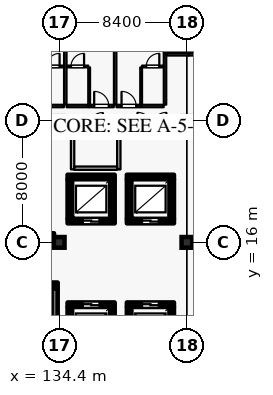
"""IFC4 building model, lengths in metres.
Left out: names, types, materials, properties, quantities, classifications, styles, units other than length and angle.
Written with IfcOpenShell. Run it as: python <this file> out.ifc"""

import sys

from ifc_helpers import new_model, si_unit, direction, frame, frame_2d, origin, origin_2d, place, context, subcontext, project, spatial, rectangle, hollow_rectangle, extrude, element, fill, save


model = new_model("IFC4")
c1 = context("Model", 3, precision=1e-05, world=origin(), true_north=direction((0.0, 1.0)))
c2 = subcontext(c1, "Body", "Model", "MODEL_VIEW")
j1 = project(units=[si_unit("LENGTHUNIT", "METRE"), si_unit("PLANEANGLEUNIT", "RADIAN")], contexts=[c1])
p1 = place(None, origin())
s1 = spatial("IfcSite", under=j1, at=p1, CompositionType="ELEMENT")
p2 = place(p1, origin())
s2 = spatial("IfcBuilding", under=s1, at=p2, CompositionType="ELEMENT")
p3 = place(p2, frame((0.0, 0.0, 36.0)))
s3 = spatial("IfcBuildingStorey", under=s2, at=p3, CompositionType="ELEMENT", Elevation=36.0)
for number, where, z_axis, x_axis in (
    (1, (134.4, 16.0, 0.0), (0.0, 0.0, 1.0), (1.0, 0.0, 0.0)),
    (2, (142.8, 16.0, 0.0), (0.0, 0.0, 1.0), (1.0, 0.0, 0.0)),
):
    element("IfcColumn", number, at=place(p3, frame(where, z_axis=z_axis, x_axis=x_axis)), inside=s3, PredefinedType="COLUMN", context=c2, shape_type="SweptSolid", body=[
        extrude(rectangle(XDim=0.7, YDim=0.7, at=origin_2d()), origin(), (0.0, 0.0, 1.0), 3.6),
    ])
for number, where, z_axis, x_axis in (
    (3, (134.4, 24.0, 0.0), (0.0, 0.0, 1.0), (1.0, 0.0, 0.0)),
    (4, (142.8, 24.0, 0.0), (0.0, 0.0, 1.0), (1.0, 0.0, 0.0)),
):
    element("IfcColumn", number, at=place(p3, frame(where, z_axis=z_axis, x_axis=x_axis)), inside=s3, PredefinedType="COLUMN", context=c2, shape_type="SweptSolid", body=[
        extrude(rectangle(XDim=0.6, YDim=0.6, at=origin_2d()), origin(), (0.0, 0.0, 1.0), 3.6),
    ])
p4 = place(p3, frame((134.95, 17.4, 0.0), z_axis=(0.0, 0.0, 1.0), x_axis=(1.0, 0.0, 0.0)))
e5 = element("IfcWall", 5, at=p4, inside=s3, PredefinedType="SHEAR", context=c2, shape_type="SweptSolid", body=[
    extrude(rectangle(XDim=3.1, YDim=0.3, at=frame_2d((1.55, 0.0))), origin(), (0.0, 0.0, 1.0), 3.365),
])
p5 = place(p4, frame((1.0, 0.0, 0.0)))
e6 = element("IfcOpeningElement", 6, at=p5, cuts=e5, PredefinedType="OPENING", context=c2, shape_type="SweptSolid", body=[
    extrude(rectangle(XDim=1.1, YDim=2.2, at=frame_2d((0.55, 1.1))), frame((0.0, 0.16, 0.0), z_axis=(0.0, -1.0, 0.0), x_axis=(1.0, 0.0, 0.0)), (0.0, 0.0, 1.0), 0.32),
])
p6 = place(p3, frame((137.9, 17.555, 0.0), z_axis=(0.0, 0.0, 1.0), x_axis=(0.0, 1.0, 0.0)))
e7 = element("IfcWall", 7, at=p6, inside=s3, PredefinedType="SHEAR", context=c2, shape_type="SweptSolid", body=[
    extrude(rectangle(XDim=2.59, YDim=0.3, at=frame_2d((1.295, 0.0))), origin(), (0.0, 0.0, 1.0), 3.365),
])
p7 = place(p3, frame((138.05, 20.3, 0.0), z_axis=(0.0, 0.0, 1.0), x_axis=(-1.0, 0.0, 0.0)))
e8 = element("IfcWall", 8, at=p7, inside=s3, PredefinedType="SHEAR", context=c2, shape_type="SweptSolid", body=[
    extrude(rectangle(XDim=3.1, YDim=0.3, at=frame_2d((1.55, 0.0))), origin(), (0.0, 0.0, 1.0), 3.365),
])
p8 = place(p3, frame((135.1, 20.145, 0.0), z_axis=(0.0, 0.0, 1.0), x_axis=(0.0, -1.0, 0.0)))
e9 = element("IfcWall", 9, at=p8, inside=s3, PredefinedType="SHEAR", context=c2, shape_type="SweptSolid", body=[
    extrude(rectangle(XDim=2.59, YDim=0.3, at=frame_2d((1.295, 0.0))), origin(), (0.0, 0.0, 1.0), 3.365),
])
p9 = place(p3, frame((138.85, 17.4, 0.0), z_axis=(0.0, 0.0, 1.0), x_axis=(1.0, 0.0, 0.0)))
e10 = element("IfcWall", 10, at=p9, inside=s3, PredefinedType="SHEAR", context=c2, shape_type="SweptSolid", body=[
    extrude(rectangle(XDim=3.1, YDim=0.3, at=frame_2d((1.55, 0.0))), origin(), (0.0, 0.0, 1.0), 3.365),
])
p10 = place(p9, frame((1.0, 0.0, 0.0)))
e11 = element("IfcOpeningElement", 11, at=p10, cuts=e10, PredefinedType="OPENING", context=c2, shape_type="SweptSolid", body=[
    extrude(rectangle(XDim=1.1, YDim=2.2, at=frame_2d((0.55, 1.1))), frame((0.0, 0.16, 0.0), z_axis=(0.0, -1.0, 0.0), x_axis=(1.0, 0.0, 0.0)), (0.0, 0.0, 1.0), 0.32),
])
p11 = place(p3, frame((141.8, 17.555, 0.0), z_axis=(0.0, 0.0, 1.0), x_axis=(0.0, 1.0, 0.0)))
e12 = element("IfcWall", 12, at=p11, inside=s3, PredefinedType="SHEAR", context=c2, shape_type="SweptSolid", body=[
    extrude(rectangle(XDim=2.59, YDim=0.3, at=frame_2d((1.295, 0.0))), origin(), (0.0, 0.0, 1.0), 3.365),
])
p12 = place(p3, frame((141.95, 20.3, 0.0), z_axis=(0.0, 0.0, 1.0), x_axis=(-1.0, 0.0, 0.0)))
e13 = element("IfcWall", 13, at=p12, inside=s3, PredefinedType="SHEAR", context=c2, shape_type="SweptSolid", body=[
    extrude(rectangle(XDim=3.1, YDim=0.3, at=frame_2d((1.55, 0.0))), origin(), (0.0, 0.0, 1.0), 3.365),
])
for number, where, z_axis, x_axis in (
    (14, (139.0, 20.145, 0.0), (0.0, 0.0, 1.0), (0.0, -1.0, 0.0)),
    (15, (137.9, 9.155, 0.0), (0.0, 0.0, 1.0), (0.0, 1.0, 0.0)),
):
    element("IfcWall", number, at=place(p3, frame(where, z_axis=z_axis, x_axis=x_axis)), inside=s3, PredefinedType="SHEAR", context=c2, shape_type="SweptSolid", body=[
        extrude(rectangle(XDim=2.59, YDim=0.3, at=frame_2d((1.295, 0.0))), origin(), (0.0, 0.0, 1.0), 3.365),
    ])
p13 = place(p3, frame((138.05, 11.9, 0.0), z_axis=(0.0, 0.0, 1.0), x_axis=(-1.0, 0.0, 0.0)))
e16 = element("IfcWall", 16, at=p13, inside=s3, PredefinedType="SHEAR", context=c2, shape_type="SweptSolid", body=[
    extrude(rectangle(XDim=3.1, YDim=0.3, at=frame_2d((1.55, 0.0))), origin(), (0.0, 0.0, 1.0), 3.365),
])
p14 = place(p13, frame((1.0, 0.0, 0.0)))
e17 = element("IfcOpeningElement", 17, at=p14, cuts=e16, PredefinedType="OPENING", context=c2, shape_type="SweptSolid", body=[
    extrude(rectangle(XDim=1.1, YDim=2.2, at=frame_2d((0.55, 1.1))), frame((0.0, 0.16, 0.0), z_axis=(0.0, -1.0, 0.0), x_axis=(1.0, 0.0, 0.0)), (0.0, 0.0, 1.0), 0.32),
])
for number, where, z_axis, x_axis in (
    (18, (135.1, 11.745, 0.0), (0.0, 0.0, 1.0), (0.0, -1.0, 0.0)),
    (19, (141.8, 9.155, 0.0), (0.0, 0.0, 1.0), (0.0, 1.0, 0.0)),
):
    element("IfcWall", number, at=place(p3, frame(where, z_axis=z_axis, x_axis=x_axis)), inside=s3, PredefinedType="SHEAR", context=c2, shape_type="SweptSolid", body=[
        extrude(rectangle(XDim=2.59, YDim=0.3, at=frame_2d((1.295, 0.0))), origin(), (0.0, 0.0, 1.0), 3.365),
    ])
p15 = place(p3, frame((141.95, 11.9, 0.0), z_axis=(0.0, 0.0, 1.0), x_axis=(-1.0, 0.0, 0.0)))
e20 = element("IfcWall", 20, at=p15, inside=s3, PredefinedType="SHEAR", context=c2, shape_type="SweptSolid", body=[
    extrude(rectangle(XDim=3.1, YDim=0.3, at=frame_2d((1.55, 0.0))), origin(), (0.0, 0.0, 1.0), 3.365),
])
p16 = place(p15, frame((1.0, 0.0, 0.0)))
e21 = element("IfcOpeningElement", 21, at=p16, cuts=e20, PredefinedType="OPENING", context=c2, shape_type="SweptSolid", body=[
    extrude(rectangle(XDim=1.1, YDim=2.2, at=frame_2d((0.55, 1.1))), frame((0.0, 0.16, 0.0), z_axis=(0.0, -1.0, 0.0), x_axis=(1.0, 0.0, 0.0)), (0.0, 0.0, 1.0), 0.32),
])
p17 = place(p3, frame((139.0, 11.745, 0.0), z_axis=(0.0, 0.0, 1.0), x_axis=(0.0, -1.0, 0.0)))
e22 = element("IfcWall", 22, at=p17, inside=s3, PredefinedType="SHEAR", context=c2, shape_type="SweptSolid", body=[
    extrude(rectangle(XDim=2.59, YDim=0.3, at=frame_2d((1.295, 0.0))), origin(), (0.0, 0.0, 1.0), 3.365),
])
p18 = place(p3, frame((134.06, 16.45, 0.0), z_axis=(0.0, 0.0, 1.0), x_axis=(-1.0, 0.0, 0.0)))
e23 = element("IfcWall", 23, at=p18, inside=s3, PredefinedType="SHEAR", context=c2, shape_type="SweptSolid", body=[
    extrude(rectangle(XDim=4.01, YDim=0.3, at=frame_2d((2.005, 0.0))), origin(), (0.0, 0.0, 1.0), 3.365),
])
p19 = place(p18, frame((1.635, 0.0, 0.0)))
e24 = element("IfcOpeningElement", 24, at=p19, cuts=e23, PredefinedType="OPENING", context=c2, shape_type="SweptSolid", body=[
    extrude(rectangle(XDim=1.25, YDim=2.25, at=frame_2d((0.625, 1.125))), frame((0.0, 0.16, 0.0), z_axis=(0.0, -1.0, 0.0), x_axis=(1.0, 0.0, 0.0)), (0.0, 0.0, 1.0), 0.32),
])
p20 = place(p3, frame((134.1, 9.005, 0.0), z_axis=(0.0, 0.0, 1.0), x_axis=(0.0, 1.0, 0.0)))
e25 = element("IfcWall", 25, at=p20, inside=s3, PredefinedType="SHEAR", context=c2, shape_type="SweptSolid", body=[
    extrude(rectangle(XDim=3.95, YDim=0.4, at=frame_2d((1.975, 0.0))), origin(), (0.0, 0.0, 1.0), 3.365),
])
p21 = place(p3, frame((126.1, 13.16, 0.0), z_axis=(0.0, 0.0, 1.0), x_axis=(1.0, 0.0, 0.0)))
e26 = element("IfcWall", 26, at=p21, inside=s3, PredefinedType="SHEAR", context=c2, shape_type="SweptSolid", body=[
    extrude(rectangle(XDim=8.2, YDim=0.4, at=frame_2d((4.1, 0.0))), origin(), (0.0, 0.0, 1.0), 3.365),
])
p22 = place(p21, frame((0.43, 0.0, 0.0)))
e27 = element("IfcOpeningElement", 27, at=p22, cuts=e26, PredefinedType="OPENING", context=c2, shape_type="SweptSolid", body=[
    extrude(rectangle(XDim=1.16, YDim=2.2, at=frame_2d((0.58, 1.1))), frame((0.0, 0.21, 0.0), z_axis=(0.0, -1.0, 0.0), x_axis=(1.0, 0.0, 0.0)), (0.0, 0.0, 1.0), 0.42),
])
p23 = place(p3, frame((133.92, 13.16, -1.8), z_axis=(0.0, 0.0, 1.0), x_axis=(1.0, 0.0, 0.0)))
e28 = element("IfcColumn", 28, at=p23, inside=s3, PredefinedType="COLUMN", context=c2, shape_type="SweptSolid", body=[
    extrude(hollow_rectangle(XDim=0.3, YDim=0.3, WallThickness=0.012, at=origin_2d()), origin(), (0.0, 0.0, 1.0), 3.42),
])
p24 = place(p3, frame((133.24, 24.97, 0.0), z_axis=(0.0, 0.0, 1.0), x_axis=(1.0, 0.0, 0.0)))
e29 = element("IfcWall", 29, at=p24, inside=s3, PredefinedType="PARTITIONING", context=c2, shape_type="SweptSolid", body=[
    extrude(rectangle(XDim=1.47, YDim=0.16, at=frame_2d((0.735, 0.0))), origin(), (0.0, 0.0, 1.0), 3.365),
])
p25 = place(p3, frame((133.29, 27.57, 0.0), z_axis=(0.0, 0.0, 1.0), x_axis=(1.0, 0.0, 0.0)))
e30 = element("IfcWall", 30, at=p25, inside=s3, PredefinedType="PARTITIONING", context=c2, shape_type="SweptSolid", body=[
    extrude(rectangle(XDim=1.41, YDim=0.115, at=frame_2d((0.705, 0.0))), origin(), (0.0, 0.0, 1.0), 3.365),
])
p26 = place(p25, frame((0.275, 0.0, 0.0)))
e31 = element("IfcOpeningElement", 31, at=p26, cuts=e30, PredefinedType="OPENING", context=c2, shape_type="SweptSolid", body=[
    extrude(rectangle(XDim=0.86, YDim=2.12, at=frame_2d((0.43, 1.06))), frame((0.0, 0.067, 0.0), z_axis=(0.0, -1.0, 0.0), x_axis=(1.0, 0.0, 0.0)), (0.0, 0.0, 1.0), 0.135),
])
p27 = place(p3, frame((134.89, 24.97, 0.0), z_axis=(0.0, 0.0, 1.0), x_axis=(1.0, 0.0, 0.0)))
e32 = element("IfcWall", 32, at=p27, inside=s3, PredefinedType="PARTITIONING", context=c2, shape_type="SweptSolid", body=[
    extrude(rectangle(XDim=1.47, YDim=0.16, at=frame_2d((0.735, 0.0))), origin(), (0.0, 0.0, 1.0), 3.365),
])
p28 = place(p3, frame((136.37, 24.97, 0.0), z_axis=(0.0, 0.0, 1.0), x_axis=(1.0, 0.0, 0.0)))
e33 = element("IfcWall", 33, at=p28, inside=s3, PredefinedType="PARTITIONING", context=c2, shape_type="SweptSolid", body=[
    extrude(rectangle(XDim=1.62, YDim=0.16, at=frame_2d((0.81, 0.0))), origin(), (0.0, 0.0, 1.0), 3.365),
])
p29 = place(p28, frame((0.33, 0.0, 0.0)))
e34 = element("IfcOpeningElement", 34, at=p29, cuts=e33, PredefinedType="OPENING", context=c2, shape_type="SweptSolid", body=[
    extrude(rectangle(XDim=0.96, YDim=2.2, at=frame_2d((0.48, 1.1))), frame((0.0, 0.09, 0.0), z_axis=(0.0, -1.0, 0.0), x_axis=(1.0, 0.0, 0.0)), (0.0, 0.0, 1.0), 0.18),
])
p30 = place(p3, frame((136.37, 25.06, 0.0), z_axis=(0.0, 0.0, 1.0), x_axis=(0.0, 1.0, 0.0)))
e35 = element("IfcWall", 35, at=p30, inside=s3, PredefinedType="PARTITIONING", context=c2, shape_type="SweptSolid", body=[
    extrude(rectangle(XDim=2.45, YDim=0.115, at=frame_2d((1.225, 0.0))), origin(), (0.0, 0.0, 1.0), 3.365),
])
p31 = place(p3, frame((134.9, 27.57, 0.0), z_axis=(0.0, 0.0, 1.0), x_axis=(1.0, 0.0, 0.0)))
e36 = element("IfcWall", 36, at=p31, inside=s3, PredefinedType="PARTITIONING", context=c2, shape_type="SweptSolid", body=[
    extrude(rectangle(XDim=1.41, YDim=0.115, at=frame_2d((0.705, 0.0))), origin(), (0.0, 0.0, 1.0), 3.365),
])
p32 = place(p31, frame((0.275, 0.0, 0.0)))
e37 = element("IfcOpeningElement", 37, at=p32, cuts=e36, PredefinedType="OPENING", context=c2, shape_type="SweptSolid", body=[
    extrude(rectangle(XDim=0.86, YDim=2.12, at=frame_2d((0.43, 1.06))), frame((0.0, 0.067, 0.0), z_axis=(0.0, -1.0, 0.0), x_axis=(1.0, 0.0, 0.0)), (0.0, 0.0, 1.0), 0.135),
])
p33 = place(p3, frame((134.8, 25.06, 0.0), z_axis=(0.0, 0.0, 1.0), x_axis=(0.0, 1.0, 0.0)))
e38 = element("IfcWall", 38, at=p33, inside=s3, PredefinedType="PARTITIONING", context=c2, shape_type="SweptSolid", body=[
    extrude(rectangle(XDim=6.6, YDim=0.16, at=frame_2d((3.3, 0.0))), origin(), (0.0, 0.0, 1.0), 3.365),
])
p34 = place(p3, frame((138.17, 24.97, 0.0), z_axis=(0.0, 0.0, 1.0), x_axis=(1.0, 0.0, 0.0)))
e39 = element("IfcWall", 39, at=p34, inside=s3, PredefinedType="PARTITIONING", context=c2, shape_type="SweptSolid", body=[
    extrude(rectangle(XDim=1.62, YDim=0.16, at=frame_2d((0.81, 0.0))), origin(), (0.0, 0.0, 1.0), 3.365),
])
p35 = place(p34, frame((0.33, 0.0, 0.0)))
e40 = element("IfcOpeningElement", 40, at=p35, cuts=e39, PredefinedType="OPENING", context=c2, shape_type="SweptSolid", body=[
    extrude(rectangle(XDim=0.96, YDim=2.2, at=frame_2d((0.48, 1.1))), frame((0.0, 0.09, 0.0), z_axis=(0.0, -1.0, 0.0), x_axis=(1.0, 0.0, 0.0)), (0.0, 0.0, 1.0), 0.18),
])
p36 = place(p3, frame((139.8, 24.97, 0.0), z_axis=(0.0, 0.0, 1.0), x_axis=(1.0, 0.0, 0.0)))
e41 = element("IfcWall", 41, at=p36, inside=s3, PredefinedType="PARTITIONING", context=c2, shape_type="SweptSolid", body=[
    extrude(rectangle(XDim=1.47, YDim=0.16, at=frame_2d((0.735, 0.0))), origin(), (0.0, 0.0, 1.0), 3.365),
])
p37 = place(p3, frame((139.79, 25.06, 0.0), z_axis=(0.0, 0.0, 1.0), x_axis=(0.0, 1.0, 0.0)))
e42 = element("IfcWall", 42, at=p37, inside=s3, PredefinedType="PARTITIONING", context=c2, shape_type="SweptSolid", body=[
    extrude(rectangle(XDim=2.45, YDim=0.115, at=frame_2d((1.225, 0.0))), origin(), (0.0, 0.0, 1.0), 3.365),
])
p38 = place(p3, frame((139.85, 27.57, 0.0), z_axis=(0.0, 0.0, 1.0), x_axis=(1.0, 0.0, 0.0)))
e43 = element("IfcWall", 43, at=p38, inside=s3, PredefinedType="PARTITIONING", context=c2, shape_type="SweptSolid", body=[
    extrude(rectangle(XDim=1.41, YDim=0.115, at=frame_2d((0.705, 0.0))), origin(), (0.0, 0.0, 1.0), 3.365),
])
p39 = place(p38, frame((0.275, 0.0, 0.0)))
e44 = element("IfcOpeningElement", 44, at=p39, cuts=e43, PredefinedType="OPENING", context=c2, shape_type="SweptSolid", body=[
    extrude(rectangle(XDim=0.86, YDim=2.12, at=frame_2d((0.43, 1.06))), frame((0.0, 0.067, 0.0), z_axis=(0.0, -1.0, 0.0), x_axis=(1.0, 0.0, 0.0)), (0.0, 0.0, 1.0), 0.135),
])
p40 = place(p3, frame((138.08, 25.06, 0.0), z_axis=(0.0, 0.0, 1.0), x_axis=(0.0, 1.0, 0.0)))
e45 = element("IfcWall", 45, at=p40, inside=s3, PredefinedType="PARTITIONING", context=c2, shape_type="SweptSolid", body=[
    extrude(rectangle(XDim=6.6, YDim=0.16, at=frame_2d((3.3, 0.0))), origin(), (0.0, 0.0, 1.0), 3.365),
])
p41 = place(p3, frame((141.36, 25.06, 0.0), z_axis=(0.0, 0.0, 1.0), x_axis=(0.0, 1.0, 0.0)))
e46 = element("IfcWall", 46, at=p41, inside=s3, PredefinedType="PARTITIONING", context=c2, shape_type="SweptSolid", body=[
    extrude(rectangle(XDim=3.39, YDim=0.16, at=frame_2d((1.695, 0.0))), origin(), (0.0, 0.0, 1.0), 3.365),
])
p42 = place(p3, frame((141.45, 28.37, 0.0), z_axis=(0.0, 0.0, 1.0), x_axis=(1.0, 0.0, 0.0)))
e47 = element("IfcWall", 47, at=p42, inside=s3, PredefinedType="PARTITIONING", context=c2, shape_type="SweptSolid", body=[
    extrude(rectangle(XDim=1.47, YDim=0.16, at=frame_2d((0.735, 0.0))), origin(), (0.0, 0.0, 1.0), 3.365),
])
p43 = place(p3, frame((142.93, 28.37, 0.0), z_axis=(0.0, 0.0, 1.0), x_axis=(1.0, 0.0, 0.0)))
e48 = element("IfcWall", 48, at=p43, inside=s3, PredefinedType="PARTITIONING", context=c2, shape_type="SweptSolid", body=[
    extrude(rectangle(XDim=1.62, YDim=0.16, at=frame_2d((0.81, 0.0))), origin(), (0.0, 0.0, 1.0), 3.365),
])
p44 = place(p43, frame((0.33, 0.0, 0.0)))
e49 = element("IfcOpeningElement", 49, at=p44, cuts=e48, PredefinedType="OPENING", context=c2, shape_type="SweptSolid", body=[
    extrude(rectangle(XDim=0.96, YDim=2.2, at=frame_2d((0.48, 1.1))), frame((0.0, 0.09, 0.0), z_axis=(0.0, -1.0, 0.0), x_axis=(1.0, 0.0, 0.0)), (0.0, 0.0, 1.0), 0.18),
])
p45 = place(p3, frame((142.93, 28.46, 0.0), z_axis=(0.0, 0.0, 1.0), x_axis=(0.0, 1.0, 0.0)))
e50 = element("IfcWall", 50, at=p45, inside=s3, PredefinedType="PARTITIONING", context=c2, shape_type="SweptSolid", body=[
    extrude(rectangle(XDim=1.74, YDim=0.115, at=frame_2d((0.87, 0.0))), origin(), (0.0, 0.0, 1.0), 2.74),
])
p46 = place(p3, frame((141.36, 28.46, 0.0), z_axis=(0.0, 0.0, 1.0), x_axis=(0.0, 1.0, 0.0)))
e51 = element("IfcWall", 51, at=p46, inside=s3, PredefinedType="PARTITIONING", context=c2, shape_type="SweptSolid", body=[
    extrude(rectangle(XDim=3.2, YDim=0.16, at=frame_2d((1.6, 0.0))), origin(), (0.0, 0.0, 1.0), 3.365),
])
p47 = place(p3, frame((138.96, 23.6, 0.0), z_axis=(0.0, 0.0, 1.0), x_axis=(1.0, 0.0, 0.0)))
e52 = element("IfcWall", 52, at=p47, inside=s3, PredefinedType="PARTITIONING", context=c2, shape_type="SweptSolid", body=[
    extrude(rectangle(XDim=3.08, YDim=0.14, at=frame_2d((1.54, 0.0))), origin(), (0.0, 0.0, 1.0), 3.365),
])
p48 = place(p47, frame((0.59, 0.0, 0.0)))
e53 = element("IfcOpeningElement", 53, at=p48, cuts=e52, PredefinedType="OPENING", context=c2, shape_type="SweptSolid", body=[
    extrude(rectangle(XDim=1.9, YDim=2.4, at=frame_2d((0.95, 1.2))), frame((0.0, 0.08, 0.0), z_axis=(0.0, -1.0, 0.0), x_axis=(1.0, 0.0, 0.0)), (0.0, 0.0, 1.0), 0.16),
])
p49 = place(p3, frame((135.36, 23.6, 0.0), z_axis=(0.0, 0.0, 1.0), x_axis=(1.0, 0.0, 0.0)))
e54 = element("IfcWall", 54, at=p49, inside=s3, PredefinedType="PARTITIONING", context=c2, shape_type="SweptSolid", body=[
    extrude(rectangle(XDim=2.88, YDim=0.22, at=frame_2d((1.44, 0.0))), origin(), (0.0, 0.0, 1.0), 3.365),
])
p50 = place(p49, frame((0.97, 0.0, 0.0)))
e55 = element("IfcOpeningElement", 55, at=p50, cuts=e54, PredefinedType="OPENING", context=c2, shape_type="SweptSolid", body=[
    extrude(rectangle(XDim=0.94, YDim=2.15, at=frame_2d((0.47, 1.075))), frame((0.0, 0.12, 0.0), z_axis=(0.0, -1.0, 0.0), x_axis=(1.0, 0.0, 0.0)), (0.0, 0.0, 1.0), 0.24),
])
for number, where, z_axis, x_axis in (
    (56, (135.28, 20.8, 0.0), (0.0, 0.0, 1.0), (0.0, 1.0, 0.0)),
    (57, (138.32, 20.8, 0.0), (0.0, 0.0, 1.0), (0.0, 1.0, 0.0)),
):
    element("IfcWall", number, at=place(p3, frame(where, z_axis=z_axis, x_axis=x_axis)), inside=s3, PredefinedType="PARTITIONING", context=c2, shape_type="SweptSolid", body=[
        extrude(rectangle(XDim=2.748, YDim=0.22, at=frame_2d((1.374, 0.0))), origin(), (0.0, 0.0, 1.0), 3.365),
    ])
p51 = place(p3, frame((135.39, 20.88, 0.0), z_axis=(0.0, 0.0, 1.0), x_axis=(1.0, 0.0, 0.0)))
e58 = element("IfcWall", 58, at=p51, inside=s3, PredefinedType="PARTITIONING", context=c2, shape_type="SweptSolid", body=[
    extrude(rectangle(XDim=2.82, YDim=0.22, at=frame_2d((1.41, 0.0))), origin(), (0.0, 0.0, 1.0), 3.365),
])
p52 = place(p5, origin())
e59 = element("IfcDoor", 59, at=p52, inside=s3, OperationType="DOUBLE_DOOR_SLIDING", PredefinedType="DOOR", context=c2, shape_type="SweptSolid", body=[
    extrude(rectangle(XDim=1.1, YDim=2.2, at=frame_2d((0.55, 1.1))), frame((0.0, 0.025, 0.0), z_axis=(0.0, -1.0, 0.0), x_axis=(1.0, 0.0, 0.0)), (0.0, 0.0, 1.0), 0.05),
])
fill(e6, e59)
p53 = place(p10, origin())
e60 = element("IfcDoor", 60, at=p53, inside=s3, OperationType="DOUBLE_DOOR_SLIDING", PredefinedType="DOOR", context=c2, shape_type="SweptSolid", body=[
    extrude(rectangle(XDim=1.1, YDim=2.2, at=frame_2d((0.55, 1.1))), frame((0.0, 0.025, 0.0), z_axis=(0.0, -1.0, 0.0), x_axis=(1.0, 0.0, 0.0)), (0.0, 0.0, 1.0), 0.05),
])
fill(e11, e60)
p54 = place(p14, origin())
e61 = element("IfcDoor", 61, at=p54, inside=s3, OperationType="DOUBLE_DOOR_SLIDING", PredefinedType="DOOR", context=c2, shape_type="SweptSolid", body=[
    extrude(rectangle(XDim=1.1, YDim=2.2, at=frame_2d((0.55, 1.1))), frame((0.0, 0.025, 0.0), z_axis=(0.0, -1.0, 0.0), x_axis=(1.0, 0.0, 0.0)), (0.0, 0.0, 1.0), 0.05),
])
fill(e17, e61)
p55 = place(p16, origin())
e62 = element("IfcDoor", 62, at=p55, inside=s3, OperationType="DOUBLE_DOOR_SLIDING", PredefinedType="DOOR", context=c2, shape_type="SweptSolid", body=[
    extrude(rectangle(XDim=1.1, YDim=2.2, at=frame_2d((0.55, 1.1))), frame((0.0, 0.025, 0.0), z_axis=(0.0, -1.0, 0.0), x_axis=(1.0, 0.0, 0.0)), (0.0, 0.0, 1.0), 0.05),
])
fill(e21, e62)
p56 = place(p26, origin())
e63 = element("IfcDoor", 63, at=p56, inside=s3, OperationType="SINGLE_SWING_RIGHT", PredefinedType="DOOR", context=c2, shape_type="SweptSolid", body=[
    extrude(rectangle(XDim=0.86, YDim=2.12, at=frame_2d((0.43, 1.06))), frame((0.0, 0.025, 0.0), z_axis=(0.0, -1.0, 0.0), x_axis=(1.0, 0.0, 0.0)), (0.0, 0.0, 1.0), 0.05),
])
fill(e31, e63)
p57 = place(p29, origin())
e64 = element("IfcDoor", 64, at=p57, inside=s3, OperationType="SINGLE_SWING_LEFT", PredefinedType="DOOR", context=c2, shape_type="SweptSolid", body=[
    extrude(rectangle(XDim=0.96, YDim=2.2, at=frame_2d((0.48, 1.1))), frame((0.0, 0.025, 0.0), z_axis=(0.0, -1.0, 0.0), x_axis=(1.0, 0.0, 0.0)), (0.0, 0.0, 1.0), 0.05),
])
fill(e34, e64)
p58 = place(p32, origin())
e65 = element("IfcDoor", 65, at=p58, inside=s3, OperationType="SINGLE_SWING_RIGHT", PredefinedType="DOOR", context=c2, shape_type="SweptSolid", body=[
    extrude(rectangle(XDim=0.86, YDim=2.12, at=frame_2d((0.43, 1.06))), frame((0.0, 0.025, 0.0), z_axis=(0.0, -1.0, 0.0), x_axis=(1.0, 0.0, 0.0)), (0.0, 0.0, 1.0), 0.05),
])
fill(e37, e65)
p59 = place(p35, origin())
e66 = element("IfcDoor", 66, at=p59, inside=s3, OperationType="SINGLE_SWING_LEFT", PredefinedType="DOOR", context=c2, shape_type="SweptSolid", body=[
    extrude(rectangle(XDim=0.96, YDim=2.2, at=frame_2d((0.48, 1.1))), frame((0.0, 0.025, 0.0), z_axis=(0.0, -1.0, 0.0), x_axis=(1.0, 0.0, 0.0)), (0.0, 0.0, 1.0), 0.05),
])
fill(e40, e66)
p60 = place(p39, origin())
e67 = element("IfcDoor", 67, at=p60, inside=s3, OperationType="SINGLE_SWING_RIGHT", PredefinedType="DOOR", context=c2, shape_type="SweptSolid", body=[
    extrude(rectangle(XDim=0.86, YDim=2.12, at=frame_2d((0.43, 1.06))), frame((0.0, 0.025, 0.0), z_axis=(0.0, -1.0, 0.0), x_axis=(1.0, 0.0, 0.0)), (0.0, 0.0, 1.0), 0.05),
])
fill(e44, e67)
p61 = place(p48, origin())
e68 = element("IfcDoor", 68, at=p61, inside=s3, OperationType="DOUBLE_DOOR_SINGLE_SWING", PredefinedType="DOOR", context=c2, shape_type="SweptSolid", body=[
    extrude(rectangle(XDim=1.9, YDim=2.4, at=frame_2d((0.95, 1.2))), frame((0.0, 0.025, 0.0), z_axis=(0.0, -1.0, 0.0), x_axis=(1.0, 0.0, 0.0)), (0.0, 0.0, 1.0), 0.05),
])
fill(e53, e68)
p62 = place(p50, origin())
e69 = element("IfcDoor", 69, at=p62, inside=s3, OperationType="SINGLE_SWING_RIGHT", PredefinedType="DOOR", context=c2, shape_type="SweptSolid", body=[
    extrude(rectangle(XDim=0.94, YDim=2.15, at=frame_2d((0.47, 1.075))), frame((0.0, 0.025, 0.0), z_axis=(0.0, -1.0, 0.0), x_axis=(1.0, 0.0, 0.0)), (0.0, 0.0, 1.0), 0.05),
])
fill(e55, e69)
save(model, sys.argv[1])
